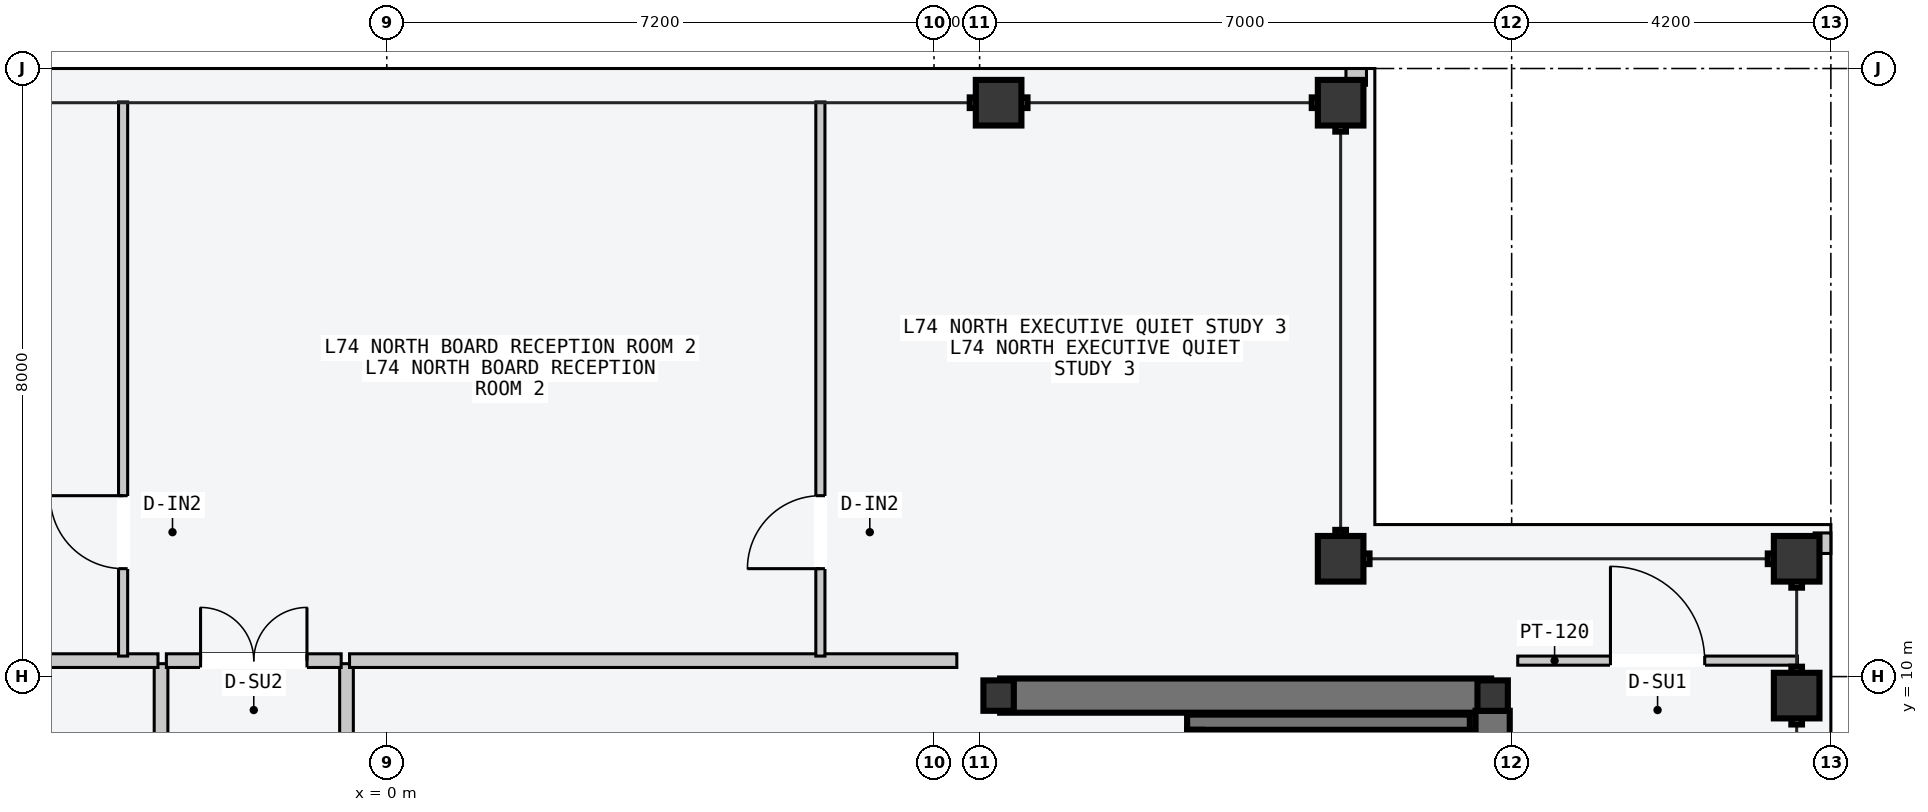
"""IFC4 building model, lengths in metres.
Left out: names, types, materials, properties, quantities, classifications, styles, units other than length and angle.
Written with IfcOpenShell. Run it as: python <this file> out.ifc"""

import sys

from ifc_helpers import new_model, si_unit, direction, frame, frame_2d, origin, origin_2d, place, context, subcontext, project, spatial, rectangle, hollow_rectangle, i_section, extrude, element, fill, save


model = new_model("IFC4")
c1 = context("Model", 3, precision=1e-05, world=origin(), true_north=direction((0.0, 1.0)))
c2 = subcontext(c1, "Body", "Model", "MODEL_VIEW")
j1 = project(units=[si_unit("LENGTHUNIT", "METRE"), si_unit("PLANEANGLEUNIT", "RADIAN")], contexts=[c1])
p1 = place(None, origin())
s1 = spatial("IfcSite", under=j1, at=p1, CompositionType="ELEMENT")
p2 = place(p1, origin())
s2 = spatial("IfcBuilding", under=s1, at=p2, CompositionType="ELEMENT")
p3 = place(p2, frame((0.0, 0.0, 280.8)))
s3 = spatial("IfcBuildingStorey", under=s2, at=p3, CompositionType="ELEMENT", Elevation=280.8)
p4 = place(p3, frame((8.07, 9.75, -0.2), z_axis=(0.0, 0.0, 1.0), x_axis=(1.0, 0.0, 0.0)))
e1 = element("IfcWall", 1, at=p4, inside=s3, PredefinedType="SHEAR", context=c2, shape_type="SweptSolid", body=[
    extrude(rectangle(XDim=6.46, YDim=0.45, at=frame_2d((3.23, 0.0))), origin(), (0.0, 0.0, 1.0), 3.6),
])
p5 = place(p3, frame((14.55, 0.2, -0.2), z_axis=(0.0, 0.0, 1.0), x_axis=(0.0, 1.0, 0.0)))
e2 = element("IfcWall", 2, at=p5, inside=s3, PredefinedType="SHEAR", context=c2, shape_type="SweptSolid", body=[
    extrude(rectangle(XDim=9.35, YDim=0.45, at=frame_2d((4.675, 0.0))), origin(), (0.0, 0.0, 1.0), 3.6),
])
p6 = place(p3, frame((14.15, 1.5, -0.2), z_axis=(0.0, 0.0, 1.0), x_axis=(0.0, 1.0, 0.0)))
e3 = element("IfcWall", 3, at=p6, inside=s3, PredefinedType="SOLIDWALL", context=c2, shape_type="SweptSolid", body=[
    extrude(rectangle(XDim=7.8, YDim=0.2, at=frame_2d((3.9, 0.0))), origin(), (0.0, 0.0, 1.0), 3.6),
])
p7 = place(p3, frame((10.53, 9.4, -0.2), z_axis=(0.0, 0.0, 1.0), x_axis=(1.0, 0.0, 0.0)))
e4 = element("IfcWall", 4, at=p7, inside=s3, PredefinedType="SOLIDWALL", context=c2, shape_type="SweptSolid", body=[
    extrude(rectangle(XDim=3.72, YDim=0.2, at=frame_2d((1.86, 0.0))), origin(), (0.0, 0.0, 1.0), 3.6),
])
p8 = place(p3, frame((10.63, 1.5, -0.2), z_axis=(0.0, 0.0, 1.0), x_axis=(0.0, 1.0, 0.0)))
e5 = element("IfcWall", 5, at=p8, inside=s3, PredefinedType="SOLIDWALL", context=c2, shape_type="SweptSolid", body=[
    extrude(rectangle(XDim=7.8, YDim=0.2, at=frame_2d((3.9, 0.0))), origin(), (0.0, 0.0, 1.0), 3.6),
])
for number, where, z_axis, x_axis in (
    (6, (8.05, 9.75, 0.0), (0.0, 0.0, 1.0), (1.0, 0.0, 0.0)),
    (7, (14.55, 9.75, 0.0), (0.0, 0.0, 1.0), (1.0, 0.0, 0.0)),
):
    element("IfcColumn", number, at=place(p3, frame(where, z_axis=z_axis, x_axis=x_axis)), inside=s3, PredefinedType="COLUMN", context=c2, shape_type="SweptSolid", body=[
        extrude(i_section(OverallWidth=0.4, OverallDepth=0.4, WebThickness=0.013, FlangeThickness=0.021, at=origin_2d()), origin(), (0.0, 0.0, 1.0), 3.6),
    ])
for number, where, z_axis, x_axis in (
    (8, (8.05, 17.55, 0.0), (0.0, 0.0, 1.0), (1.0, 0.0, 0.0)),
    (9, (12.55, 17.55, 0.0), (0.0, 0.0, 1.0), (1.0, 0.0, 0.0)),
    (10, (18.55, 9.75, 0.0), (0.0, 0.0, 1.0), (0.0, 1.0, 0.0)),
    (11, (18.55, 11.55, 0.0), (0.0, 0.0, 1.0), (0.0, 1.0, 0.0)),
    (12, (12.55, 11.55, 0.0), (0.0, 0.0, 1.0), (1.0, 0.0, 0.0)),
):
    element("IfcColumn", number, at=place(p3, frame(where, z_axis=z_axis, x_axis=x_axis)), inside=s3, PredefinedType="COLUMN", context=c2, shape_type="SweptSolid", body=[
        extrude(hollow_rectangle(XDim=0.6, YDim=0.6, WallThickness=0.025, at=origin_2d()), origin(), (0.0, 0.0, 1.0), 3.6),
    ])
for number, where, z_axis, x_axis in (
    (13, (12.62, 17.89, 0.0), (0.0, 0.0, 1.0), (1.0, 0.0, 0.0)),
    (14, (18.89, 11.62, 0.0), (0.0, 0.0, 1.0), (0.0, 1.0, 0.0)),
):
    element("IfcWall", number, at=place(p3, frame(where, z_axis=z_axis, x_axis=x_axis)), inside=s3, PredefinedType="PARAPET", context=c2, shape_type="SweptSolid", body=[
        extrude(rectangle(XDim=0.27, YDim=0.22, at=frame_2d((0.135, 0.0))), origin(), (0.0, 0.0, 1.0), 1.2),
    ])
p9 = place(p3, frame((-2.97, -3.5, 0.0), z_axis=(0.0, 0.0, 1.0), x_axis=(0.0, 1.0, 0.0)))
e15 = element("IfcWall", 15, at=p9, inside=s3, PredefinedType="PARTITIONING", context=c2, shape_type="SweptSolid", body=[
    extrude(rectangle(XDim=13.67, YDim=0.18, at=frame_2d((6.835, 0.0))), origin(), (0.0, 0.0, 1.0), 3.4),
])
p10 = place(p9, frame((6.1, 0.0, 0.0)))
e16 = element("IfcOpeningElement", 16, at=p10, cuts=e15, PredefinedType="OPENING", context=c2, shape_type="SweptSolid", body=[
    extrude(rectangle(XDim=1.24, YDim=2.24, at=frame_2d((0.62, 1.12))), frame((0.0, 0.1, 0.0), z_axis=(0.0, -1.0, 0.0), x_axis=(1.0, 0.0, 0.0)), (0.0, 0.0, 1.0), 0.2),
])
p11 = place(p9, frame((1.6, 0.0, 0.0)))
e17 = element("IfcOpeningElement", 17, at=p11, cuts=e15, PredefinedType="OPENING", context=c2, shape_type="SweptSolid", body=[
    extrude(rectangle(XDim=0.96, YDim=2.18, at=frame_2d((0.48, 1.09))), frame((0.0, 0.1, 0.0), z_axis=(0.0, -1.0, 0.0), x_axis=(1.0, 0.0, 0.0)), (0.0, 0.0, 1.0), 0.2),
])
p12 = place(p3, frame((-7.5, 10.21, 0.0), z_axis=(0.0, 0.0, 1.0), x_axis=(1.0, 0.0, 0.0)))
e18 = element("IfcWall", 18, at=p12, inside=s3, PredefinedType="PARTITIONING", context=c2, shape_type="SweptSolid", body=[
    extrude(rectangle(XDim=4.49, YDim=0.18, at=frame_2d((2.245, 0.0))), origin(), (0.0, 0.0, 1.0), 3.4),
])
p13 = place(p3, frame((-0.53, -3.5, 0.0), z_axis=(0.0, 0.0, 1.0), x_axis=(0.0, 1.0, 0.0)))
e19 = element("IfcWall", 19, at=p13, inside=s3, PredefinedType="PARTITIONING", context=c2, shape_type="SweptSolid", body=[
    extrude(rectangle(XDim=13.67, YDim=0.18, at=frame_2d((6.835, 0.0))), origin(), (0.0, 0.0, 1.0), 3.4),
])
p14 = place(p13, frame((6.1, 0.0, 0.0)))
e20 = element("IfcOpeningElement", 20, at=p14, cuts=e19, PredefinedType="OPENING", context=c2, shape_type="SweptSolid", body=[
    extrude(rectangle(XDim=1.24, YDim=2.24, at=frame_2d((0.62, 1.12))), frame((0.0, 0.1, 0.0), z_axis=(0.0, -1.0, 0.0), x_axis=(1.0, 0.0, 0.0)), (0.0, 0.0, 1.0), 0.2),
])
p15 = place(p13, frame((1.6, 0.0, 0.0)))
e21 = element("IfcOpeningElement", 21, at=p15, cuts=e19, PredefinedType="OPENING", context=c2, shape_type="SweptSolid", body=[
    extrude(rectangle(XDim=0.96, YDim=2.18, at=frame_2d((0.48, 1.09))), frame((0.0, 0.1, 0.0), z_axis=(0.0, -1.0, 0.0), x_axis=(1.0, 0.0, 0.0)), (0.0, 0.0, 1.0), 0.2),
])
p16 = place(p3, frame((-0.49, 10.21, 0.0), z_axis=(0.0, 0.0, 1.0), x_axis=(1.0, 0.0, 0.0)))
e22 = element("IfcWall", 22, at=p16, inside=s3, PredefinedType="PARTITIONING", context=c2, shape_type="SweptSolid", body=[
    extrude(rectangle(XDim=7.99, YDim=0.18, at=frame_2d((3.995, 0.0))), origin(), (0.0, 0.0, 1.0), 3.4),
])
p17 = place(p3, frame((-3.469, 10.27, 0.0), z_axis=(0.0, 0.0, 1.0), x_axis=(0.0, 1.0, 0.0)))
e23 = element("IfcWall", 23, at=p17, inside=s3, PredefinedType="PARTITIONING", context=c2, shape_type="SweptSolid", body=[
    extrude(rectangle(XDim=7.29, YDim=0.12, at=frame_2d((3.645, 0.0))), origin(), (0.0, 0.0, 1.0), 3.4),
])
p18 = place(p17, frame((1.15, 0.0, 0.0)))
e24 = element("IfcOpeningElement", 24, at=p18, cuts=e23, PredefinedType="OPENING", context=c2, shape_type="SweptSolid", body=[
    extrude(rectangle(XDim=0.96, YDim=2.18, at=frame_2d((0.48, 1.09))), frame((0.0, 0.07, 0.0), z_axis=(0.0, -1.0, 0.0), x_axis=(1.0, 0.0, 0.0)), (0.0, 0.0, 1.0), 0.14),
])
p19 = place(p3, frame((5.705, 10.27, 0.0), z_axis=(0.0, 0.0, 1.0), x_axis=(0.0, 1.0, 0.0)))
e25 = element("IfcWall", 25, at=p19, inside=s3, PredefinedType="PARTITIONING", context=c2, shape_type="SweptSolid", body=[
    extrude(rectangle(XDim=7.29, YDim=0.12, at=frame_2d((3.645, 0.0))), origin(), (0.0, 0.0, 1.0), 3.4),
])
p20 = place(p19, frame((1.15, 0.0, 0.0)))
e26 = element("IfcOpeningElement", 26, at=p20, cuts=e25, PredefinedType="OPENING", context=c2, shape_type="SweptSolid", body=[
    extrude(rectangle(XDim=0.96, YDim=2.18, at=frame_2d((0.48, 1.09))), frame((0.0, 0.07, 0.0), z_axis=(0.0, -1.0, 0.0), x_axis=(1.0, 0.0, 0.0)), (0.0, 0.0, 1.0), 0.14),
])
p21 = place(p3, frame((-2.9, 10.21, 0.0), z_axis=(0.0, 0.0, 1.0), x_axis=(1.0, 0.0, 0.0)))
e27 = element("IfcWall", 27, at=p21, inside=s3, PredefinedType="PARTITIONING", context=c2, shape_type="SweptSolid", body=[
    extrude(rectangle(XDim=2.3, YDim=0.18, at=frame_2d((1.15, 0.0))), origin(), (0.0, 0.0, 1.0), 3.4),
])
p22 = place(p21, frame((0.45, 0.0, 0.0)))
e28 = element("IfcOpeningElement", 28, at=p22, cuts=e27, PredefinedType="OPENING", context=c2, shape_type="SweptSolid", body=[
    extrude(rectangle(XDim=1.4, YDim=2.2, at=frame_2d((0.7, 1.1))), frame((0.0, 0.1, 0.0), z_axis=(0.0, -1.0, 0.0), x_axis=(1.0, 0.0, 0.0)), (0.0, 0.0, 1.0), 0.2),
])
p23 = place(p3, frame((14.88, 10.21, 0.0), z_axis=(0.0, 0.0, 1.0), x_axis=(1.0, 0.0, 0.0)))
e29 = element("IfcWall", 29, at=p23, inside=s3, PredefinedType="PARTITIONING", context=c2, shape_type="SweptSolid", body=[
    extrude(rectangle(XDim=3.68, YDim=0.12, at=frame_2d((1.84, 0.0))), origin(), (0.0, 0.0, 1.0), 3.4),
])
p24 = place(p23, frame((1.22, 0.0, 0.0)))
e30 = element("IfcOpeningElement", 30, at=p24, cuts=e29, PredefinedType="OPENING", context=c2, shape_type="SweptSolid", body=[
    extrude(rectangle(XDim=1.24, YDim=2.24, at=frame_2d((0.62, 1.12))), frame((0.0, 0.07, 0.0), z_axis=(0.0, -1.0, 0.0), x_axis=(1.0, 0.0, 0.0)), (0.0, 0.0, 1.0), 0.14),
])
p25 = place(p18, origin())
e31 = element("IfcDoor", 31, at=p25, inside=s3, OperationType="SINGLE_SWING_RIGHT", PredefinedType="DOOR", context=c2, shape_type="SweptSolid", body=[
    extrude(rectangle(XDim=0.96, YDim=2.18, at=frame_2d((0.48, 1.09))), frame((0.0, 0.025, 0.0), z_axis=(0.0, -1.0, 0.0), x_axis=(1.0, 0.0, 0.0)), (0.0, 0.0, 1.0), 0.05),
])
fill(e24, e31)
p26 = place(p20, origin())
e32 = element("IfcDoor", 32, at=p26, inside=s3, OperationType="SINGLE_SWING_LEFT", PredefinedType="DOOR", context=c2, shape_type="SweptSolid", body=[
    extrude(rectangle(XDim=0.96, YDim=2.18, at=frame_2d((0.48, 1.09))), frame((0.0, 0.025, 0.0), z_axis=(0.0, -1.0, 0.0), x_axis=(1.0, 0.0, 0.0)), (0.0, 0.0, 1.0), 0.05),
])
fill(e26, e32)
p27 = place(p22, origin())
e33 = element("IfcDoor", 33, at=p27, inside=s3, OperationType="DOUBLE_DOOR_SINGLE_SWING", PredefinedType="DOOR", context=c2, shape_type="SweptSolid", body=[
    extrude(rectangle(XDim=1.4, YDim=2.2, at=frame_2d((0.7, 1.1))), frame((0.0, 0.025, 0.0), z_axis=(0.0, -1.0, 0.0), x_axis=(1.0, 0.0, 0.0)), (0.0, 0.0, 1.0), 0.05),
])
fill(e28, e33)
p28 = place(p24, origin())
e34 = element("IfcDoor", 34, at=p28, inside=s3, OperationType="SINGLE_SWING_LEFT", PredefinedType="DOOR", context=c2, shape_type="SweptSolid", body=[
    extrude(rectangle(XDim=1.24, YDim=2.24, at=frame_2d((0.62, 1.12))), frame((0.0, 0.025, 0.0), z_axis=(0.0, -1.0, 0.0), x_axis=(1.0, 0.0, 0.0)), (0.0, 0.0, 1.0), 0.05),
])
fill(e30, e34)
save(model, sys.argv[1])
